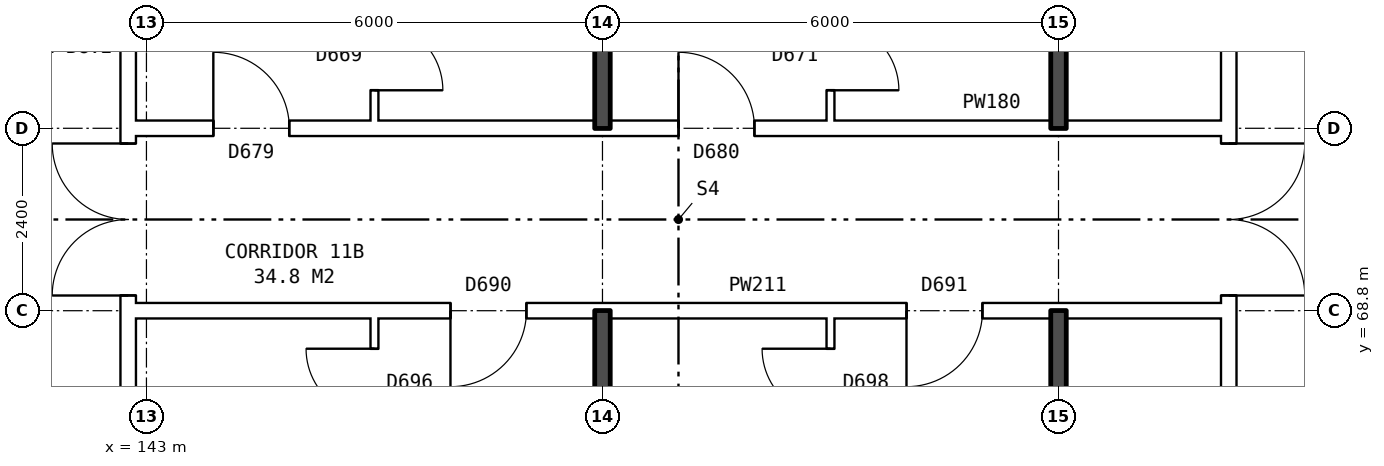
"""IFC4 building model, lengths in metres.
Left out: names, types, materials, properties, quantities, classifications, styles, units other than length and angle.
Written with IfcOpenShell. Run it as: python <this file> out.ifc"""

import sys

from ifc_helpers import new_model, si_unit, direction, frame, frame_2d, origin, place, context, subcontext, project, spatial, rectangle, extrude, element, fill, save


model = new_model("IFC4")
c1 = context("Model", 3, precision=1e-05, world=origin(), true_north=direction((0.0, 1.0)))
c2 = subcontext(c1, "Body", "Model", "MODEL_VIEW")
j1 = project(units=[si_unit("LENGTHUNIT", "METRE"), si_unit("PLANEANGLEUNIT", "RADIAN")], contexts=[c1])
p1 = place(None, origin())
s1 = spatial("IfcSite", under=j1, at=p1, CompositionType="ELEMENT")
p2 = place(p1, origin())
s2 = spatial("IfcBuilding", under=s1, at=p2, CompositionType="ELEMENT")
p3 = place(p2, frame((0.0, 0.0, 44.3)))
s3 = spatial("IfcBuildingStorey", under=s2, at=p3, CompositionType="ELEMENT", Elevation=44.3)
p4 = place(p3, frame((142.76, 63.9, 0.0), z_axis=(0.0, 0.0, 1.0), x_axis=(0.0, 1.0, 0.0)))
e1 = element("IfcWall", 1, at=p4, inside=s3, PredefinedType="PARTITIONING", context=c2, shape_type="SweptSolid", body=[
    extrude(rectangle(XDim=12.2, YDim=0.2, at=frame_2d((6.1, 0.0))), origin(), (0.0, 0.0, 1.0), 2.85),
])
p5 = place(p4, frame((5.1, 0.0, 0.0)))
e2 = element("IfcOpeningElement", 2, at=p5, cuts=e1, PredefinedType="OPENING", context=c2, shape_type="SweptSolid", body=[
    extrude(rectangle(XDim=2.0, YDim=2.1, at=frame_2d((1.0, 1.05))), frame((0.0, 0.11, 0.0), z_axis=(0.0, -1.0, 0.0), x_axis=(1.0, 0.0, 0.0)), (0.0, 0.0, 1.0), 0.22),
])
p6 = place(p3, frame((157.24, 63.9, 0.0), z_axis=(0.0, 0.0, 1.0), x_axis=(0.0, 1.0, 0.0)))
e3 = element("IfcWall", 3, at=p6, inside=s3, PredefinedType="PARTITIONING", context=c2, shape_type="SweptSolid", body=[
    extrude(rectangle(XDim=12.2, YDim=0.2, at=frame_2d((6.1, 0.0))), origin(), (0.0, 0.0, 1.0), 2.85),
])
p7 = place(p6, frame((5.1, 0.0, 0.0)))
e4 = element("IfcOpeningElement", 4, at=p7, cuts=e3, PredefinedType="OPENING", context=c2, shape_type="SweptSolid", body=[
    extrude(rectangle(XDim=2.0, YDim=2.1, at=frame_2d((1.0, 1.05))), frame((0.0, 0.11, 0.0), z_axis=(0.0, -1.0, 0.0), x_axis=(1.0, 0.0, 0.0)), (0.0, 0.0, 1.0), 0.22),
])
p8 = place(p3, frame((142.76, 68.8, 0.0), z_axis=(0.0, 0.0, 1.0), x_axis=(1.0, 0.0, 0.0)))
e5 = element("IfcWall", 5, at=p8, inside=s3, PredefinedType="PARTITIONING", context=c2, shape_type="SweptSolid", body=[
    extrude(rectangle(XDim=14.48, YDim=0.2, at=frame_2d((7.24, 0.0))), origin(), (0.0, 0.0, 1.0), 2.85),
])
p9 = place(p8, frame((4.24, 0.0, 0.0)))
e6 = element("IfcOpeningElement", 6, at=p9, cuts=e5, PredefinedType="OPENING", context=c2, shape_type="SweptSolid", body=[
    extrude(rectangle(XDim=1.0, YDim=2.1, at=frame_2d((0.5, 1.05))), frame((0.0, 0.11, 0.0), z_axis=(0.0, -1.0, 0.0), x_axis=(1.0, 0.0, 0.0)), (0.0, 0.0, 1.0), 0.22),
])
p10 = place(p8, frame((10.24, 0.0, 0.0)))
e7 = element("IfcOpeningElement", 7, at=p10, cuts=e5, PredefinedType="OPENING", context=c2, shape_type="SweptSolid", body=[
    extrude(rectangle(XDim=1.0, YDim=2.1, at=frame_2d((0.5, 1.05))), frame((0.0, 0.11, 0.0), z_axis=(0.0, -1.0, 0.0), x_axis=(1.0, 0.0, 0.0)), (0.0, 0.0, 1.0), 0.22),
])
p11 = place(p3, frame((142.76, 71.2, 0.0), z_axis=(0.0, 0.0, 1.0), x_axis=(1.0, 0.0, 0.0)))
e8 = element("IfcWall", 8, at=p11, inside=s3, PredefinedType="PARTITIONING", context=c2, shape_type="SweptSolid", body=[
    extrude(rectangle(XDim=14.48, YDim=0.2, at=frame_2d((7.24, 0.0))), origin(), (0.0, 0.0, 1.0), 2.85),
])
p12 = place(p11, frame((1.12, 0.0, 0.0)))
e9 = element("IfcOpeningElement", 9, at=p12, cuts=e8, PredefinedType="OPENING", context=c2, shape_type="SweptSolid", body=[
    extrude(rectangle(XDim=1.0, YDim=2.1, at=frame_2d((0.5, 1.05))), frame((0.0, 0.11, 0.0), z_axis=(0.0, -1.0, 0.0), x_axis=(1.0, 0.0, 0.0)), (0.0, 0.0, 1.0), 0.22),
])
p13 = place(p11, frame((7.24, 0.0, 0.0)))
e10 = element("IfcOpeningElement", 10, at=p13, cuts=e8, PredefinedType="OPENING", context=c2, shape_type="SweptSolid", body=[
    extrude(rectangle(XDim=1.0, YDim=2.1, at=frame_2d((0.5, 1.05))), frame((0.0, 0.11, 0.0), z_axis=(0.0, -1.0, 0.0), x_axis=(1.0, 0.0, 0.0)), (0.0, 0.0, 1.0), 0.22),
])
p14 = place(p3, frame((146.0, 54.36, 0.0), z_axis=(0.0, 0.0, 1.0), x_axis=(0.0, 1.0, 0.0)))
e11 = element("IfcWall", 11, at=p14, inside=s3, PredefinedType="PARTITIONING", context=c2, shape_type="SweptSolid", body=[
    extrude(rectangle(XDim=14.34, YDim=0.1, at=frame_2d((7.17, 0.0))), origin(), (0.0, 0.0, 1.0), 2.85),
])
p15 = place(p14, frame((5.5, 0.0, 0.0)))
e12 = element("IfcOpeningElement", 12, at=p15, cuts=e11, PredefinedType="OPENING", context=c2, shape_type="SweptSolid", body=[
    extrude(rectangle(XDim=0.9, YDim=2.1, at=frame_2d((0.45, 1.05))), frame((0.0, 0.06, 0.0), z_axis=(0.0, -1.0, 0.0), x_axis=(1.0, 0.0, 0.0)), (0.0, 0.0, 1.0), 0.12),
])
p16 = place(p14, frame((13.04, 0.0, 0.0)))
e13 = element("IfcOpeningElement", 13, at=p16, cuts=e11, PredefinedType="OPENING", context=c2, shape_type="SweptSolid", body=[
    extrude(rectangle(XDim=0.9, YDim=2.1, at=frame_2d((0.45, 1.05))), frame((0.0, 0.06, 0.0), z_axis=(0.0, -1.0, 0.0), x_axis=(1.0, 0.0, 0.0)), (0.0, 0.0, 1.0), 0.12),
])
p17 = place(p3, frame((146.0, 71.3, 0.0), z_axis=(0.0, 0.0, 1.0), x_axis=(0.0, 1.0, 0.0)))
e14 = element("IfcWall", 14, at=p17, inside=s3, PredefinedType="PARTITIONING", context=c2, shape_type="SweptSolid", body=[
    extrude(rectangle(XDim=14.34, YDim=0.1, at=frame_2d((7.17, 0.0))), origin(), (0.0, 0.0, 1.0), 2.85),
])
p18 = place(p17, frame((7.94, 0.0, 0.0)))
e15 = element("IfcOpeningElement", 15, at=p18, cuts=e14, PredefinedType="OPENING", context=c2, shape_type="SweptSolid", body=[
    extrude(rectangle(XDim=0.9, YDim=2.1, at=frame_2d((0.45, 1.05))), frame((0.0, 0.06, 0.0), z_axis=(0.0, -1.0, 0.0), x_axis=(1.0, 0.0, 0.0)), (0.0, 0.0, 1.0), 0.12),
])
p19 = place(p17, frame((0.4, 0.0, 0.0)))
e16 = element("IfcOpeningElement", 16, at=p19, cuts=e14, PredefinedType="OPENING", context=c2, shape_type="SweptSolid", body=[
    extrude(rectangle(XDim=0.9, YDim=2.1, at=frame_2d((0.45, 1.05))), frame((0.0, 0.06, 0.0), z_axis=(0.0, -1.0, 0.0), x_axis=(1.0, 0.0, 0.0)), (0.0, 0.0, 1.0), 0.12),
])
for number, where, z_axis, x_axis in (
    (17, (149.0, 54.36, 0.0), (0.0, 0.0, 1.0), (0.0, 1.0, 0.0)),
    (18, (149.0, 71.2, 0.0), (0.0, 0.0, 1.0), (0.0, 1.0, 0.0)),
):
    element("IfcWall", number, at=place(p3, frame(where, z_axis=z_axis, x_axis=x_axis)), inside=s3, PredefinedType="SOLIDWALL", context=c2, shape_type="SweptSolid", body=[
        extrude(rectangle(XDim=14.44, YDim=0.2, at=frame_2d((7.22, 0.0))), origin(), (0.0, 0.0, 1.0), 2.85),
    ])
p20 = place(p3, frame((152.0, 54.36, 0.0), z_axis=(0.0, 0.0, 1.0), x_axis=(0.0, 1.0, 0.0)))
e19 = element("IfcWall", 19, at=p20, inside=s3, PredefinedType="PARTITIONING", context=c2, shape_type="SweptSolid", body=[
    extrude(rectangle(XDim=14.34, YDim=0.1, at=frame_2d((7.17, 0.0))), origin(), (0.0, 0.0, 1.0), 2.85),
])
p21 = place(p20, frame((4.2, 0.0, 0.0)))
e20 = element("IfcOpeningElement", 20, at=p21, cuts=e19, PredefinedType="OPENING", context=c2, shape_type="SweptSolid", body=[
    extrude(rectangle(XDim=0.9, YDim=2.1, at=frame_2d((0.45, 1.05))), frame((0.0, 0.06, 0.0), z_axis=(0.0, -1.0, 0.0), x_axis=(1.0, 0.0, 0.0)), (0.0, 0.0, 1.0), 0.12),
])
p22 = place(p20, frame((13.04, 0.0, 0.0)))
e21 = element("IfcOpeningElement", 21, at=p22, cuts=e19, PredefinedType="OPENING", context=c2, shape_type="SweptSolid", body=[
    extrude(rectangle(XDim=0.9, YDim=2.1, at=frame_2d((0.45, 1.05))), frame((0.0, 0.06, 0.0), z_axis=(0.0, -1.0, 0.0), x_axis=(1.0, 0.0, 0.0)), (0.0, 0.0, 1.0), 0.12),
])
p23 = place(p3, frame((152.0, 71.3, 0.0), z_axis=(0.0, 0.0, 1.0), x_axis=(0.0, 1.0, 0.0)))
e22 = element("IfcWall", 22, at=p23, inside=s3, PredefinedType="PARTITIONING", context=c2, shape_type="SweptSolid", body=[
    extrude(rectangle(XDim=14.34, YDim=0.1, at=frame_2d((7.17, 0.0))), origin(), (0.0, 0.0, 1.0), 2.85),
])
p24 = place(p23, frame((5.74, 0.0, 0.0)))
e23 = element("IfcOpeningElement", 23, at=p24, cuts=e22, PredefinedType="OPENING", context=c2, shape_type="SweptSolid", body=[
    extrude(rectangle(XDim=0.9, YDim=2.1, at=frame_2d((0.45, 1.05))), frame((0.0, 0.06, 0.0), z_axis=(0.0, -1.0, 0.0), x_axis=(1.0, 0.0, 0.0)), (0.0, 0.0, 1.0), 0.12),
])
p25 = place(p23, frame((0.4, 0.0, 0.0)))
e24 = element("IfcOpeningElement", 24, at=p25, cuts=e22, PredefinedType="OPENING", context=c2, shape_type="SweptSolid", body=[
    extrude(rectangle(XDim=0.9, YDim=2.1, at=frame_2d((0.45, 1.05))), frame((0.0, 0.06, 0.0), z_axis=(0.0, -1.0, 0.0), x_axis=(1.0, 0.0, 0.0)), (0.0, 0.0, 1.0), 0.12),
])
for number, where, z_axis, x_axis in (
    (25, (155.0, 63.8, 0.0), (0.0, 0.0, 1.0), (0.0, 1.0, 0.0)),
    (26, (155.0, 71.2, 0.0), (0.0, 0.0, 1.0), (0.0, 1.0, 0.0)),
):
    element("IfcWall", number, at=place(p3, frame(where, z_axis=z_axis, x_axis=x_axis)), inside=s3, PredefinedType="SOLIDWALL", context=c2, shape_type="SweptSolid", body=[
        extrude(rectangle(XDim=5.0, YDim=0.2, at=frame_2d((2.5, 0.0))), origin(), (0.0, 0.0, 1.0), 2.85),
    ])
p26 = place(p5, origin())
e27 = element("IfcDoor", 27, at=p26, inside=s3, OperationType="DOUBLE_DOOR_SINGLE_SWING", PredefinedType="DOOR", context=c2, shape_type="SweptSolid", body=[
    extrude(rectangle(XDim=2.0, YDim=2.1, at=frame_2d((1.0, 1.05))), frame((0.0, 0.025, 0.0), z_axis=(0.0, -1.0, 0.0), x_axis=(1.0, 0.0, 0.0)), (0.0, 0.0, 1.0), 0.05),
])
fill(e2, e27)
p27 = place(p7, frame((2.0, 0.0, 0.0), z_axis=(0.0, 0.0, 1.0), x_axis=(-1.0, 0.0, 0.0)))
e28 = element("IfcDoor", 28, at=p27, inside=s3, OperationType="DOUBLE_DOOR_SINGLE_SWING", PredefinedType="DOOR", context=c2, shape_type="SweptSolid", body=[
    extrude(rectangle(XDim=2.0, YDim=2.1, at=frame_2d((1.0, 1.05))), frame((0.0, 0.025, 0.0), z_axis=(0.0, -1.0, 0.0), x_axis=(1.0, 0.0, 0.0)), (0.0, 0.0, 1.0), 0.05),
])
fill(e4, e28)
p28 = place(p9, frame((1.0, 0.0, 0.0), z_axis=(0.0, 0.0, 1.0), x_axis=(-1.0, 0.0, 0.0)))
e29 = element("IfcDoor", 29, at=p28, inside=s3, OperationType="SINGLE_SWING_RIGHT", PredefinedType="DOOR", context=c2, shape_type="SweptSolid", body=[
    extrude(rectangle(XDim=1.0, YDim=2.1, at=frame_2d((0.5, 1.05))), frame((0.0, 0.025, 0.0), z_axis=(0.0, -1.0, 0.0), x_axis=(1.0, 0.0, 0.0)), (0.0, 0.0, 1.0), 0.05),
])
fill(e6, e29)
p29 = place(p16, origin())
e30 = element("IfcDoor", 30, at=p29, inside=s3, OperationType="SINGLE_SWING_RIGHT", PredefinedType="DOOR", context=c2, shape_type="SweptSolid", body=[
    extrude(rectangle(XDim=0.9, YDim=2.1, at=frame_2d((0.45, 1.05))), frame((0.0, 0.025, 0.0), z_axis=(0.0, -1.0, 0.0), x_axis=(1.0, 0.0, 0.0)), (0.0, 0.0, 1.0), 0.05),
])
fill(e13, e30)
p30 = place(p10, frame((1.0, 0.0, 0.0), z_axis=(0.0, 0.0, 1.0), x_axis=(-1.0, 0.0, 0.0)))
e31 = element("IfcDoor", 31, at=p30, inside=s3, OperationType="SINGLE_SWING_RIGHT", PredefinedType="DOOR", context=c2, shape_type="SweptSolid", body=[
    extrude(rectangle(XDim=1.0, YDim=2.1, at=frame_2d((0.5, 1.05))), frame((0.0, 0.025, 0.0), z_axis=(0.0, -1.0, 0.0), x_axis=(1.0, 0.0, 0.0)), (0.0, 0.0, 1.0), 0.05),
])
fill(e7, e31)
p31 = place(p22, origin())
e32 = element("IfcDoor", 32, at=p31, inside=s3, OperationType="SINGLE_SWING_RIGHT", PredefinedType="DOOR", context=c2, shape_type="SweptSolid", body=[
    extrude(rectangle(XDim=0.9, YDim=2.1, at=frame_2d((0.45, 1.05))), frame((0.0, 0.025, 0.0), z_axis=(0.0, -1.0, 0.0), x_axis=(1.0, 0.0, 0.0)), (0.0, 0.0, 1.0), 0.05),
])
fill(e21, e32)
p32 = place(p12, origin())
e33 = element("IfcDoor", 33, at=p32, inside=s3, OperationType="SINGLE_SWING_LEFT", PredefinedType="DOOR", context=c2, shape_type="SweptSolid", body=[
    extrude(rectangle(XDim=1.0, YDim=2.1, at=frame_2d((0.5, 1.05))), frame((0.0, 0.025, 0.0), z_axis=(0.0, -1.0, 0.0), x_axis=(1.0, 0.0, 0.0)), (0.0, 0.0, 1.0), 0.05),
])
fill(e9, e33)
p33 = place(p19, frame((0.9, 0.0, 0.0), z_axis=(0.0, 0.0, 1.0), x_axis=(-1.0, 0.0, 0.0)))
e34 = element("IfcDoor", 34, at=p33, inside=s3, OperationType="SINGLE_SWING_RIGHT", PredefinedType="DOOR", context=c2, shape_type="SweptSolid", body=[
    extrude(rectangle(XDim=0.9, YDim=2.1, at=frame_2d((0.45, 1.05))), frame((0.0, 0.025, 0.0), z_axis=(0.0, -1.0, 0.0), x_axis=(1.0, 0.0, 0.0)), (0.0, 0.0, 1.0), 0.05),
])
fill(e16, e34)
p34 = place(p13, origin())
e35 = element("IfcDoor", 35, at=p34, inside=s3, OperationType="SINGLE_SWING_LEFT", PredefinedType="DOOR", context=c2, shape_type="SweptSolid", body=[
    extrude(rectangle(XDim=1.0, YDim=2.1, at=frame_2d((0.5, 1.05))), frame((0.0, 0.025, 0.0), z_axis=(0.0, -1.0, 0.0), x_axis=(1.0, 0.0, 0.0)), (0.0, 0.0, 1.0), 0.05),
])
fill(e10, e35)
p35 = place(p25, frame((0.9, 0.0, 0.0), z_axis=(0.0, 0.0, 1.0), x_axis=(-1.0, 0.0, 0.0)))
e36 = element("IfcDoor", 36, at=p35, inside=s3, OperationType="SINGLE_SWING_RIGHT", PredefinedType="DOOR", context=c2, shape_type="SweptSolid", body=[
    extrude(rectangle(XDim=0.9, YDim=2.1, at=frame_2d((0.45, 1.05))), frame((0.0, 0.025, 0.0), z_axis=(0.0, -1.0, 0.0), x_axis=(1.0, 0.0, 0.0)), (0.0, 0.0, 1.0), 0.05),
])
fill(e24, e36)
save(model, sys.argv[1])
